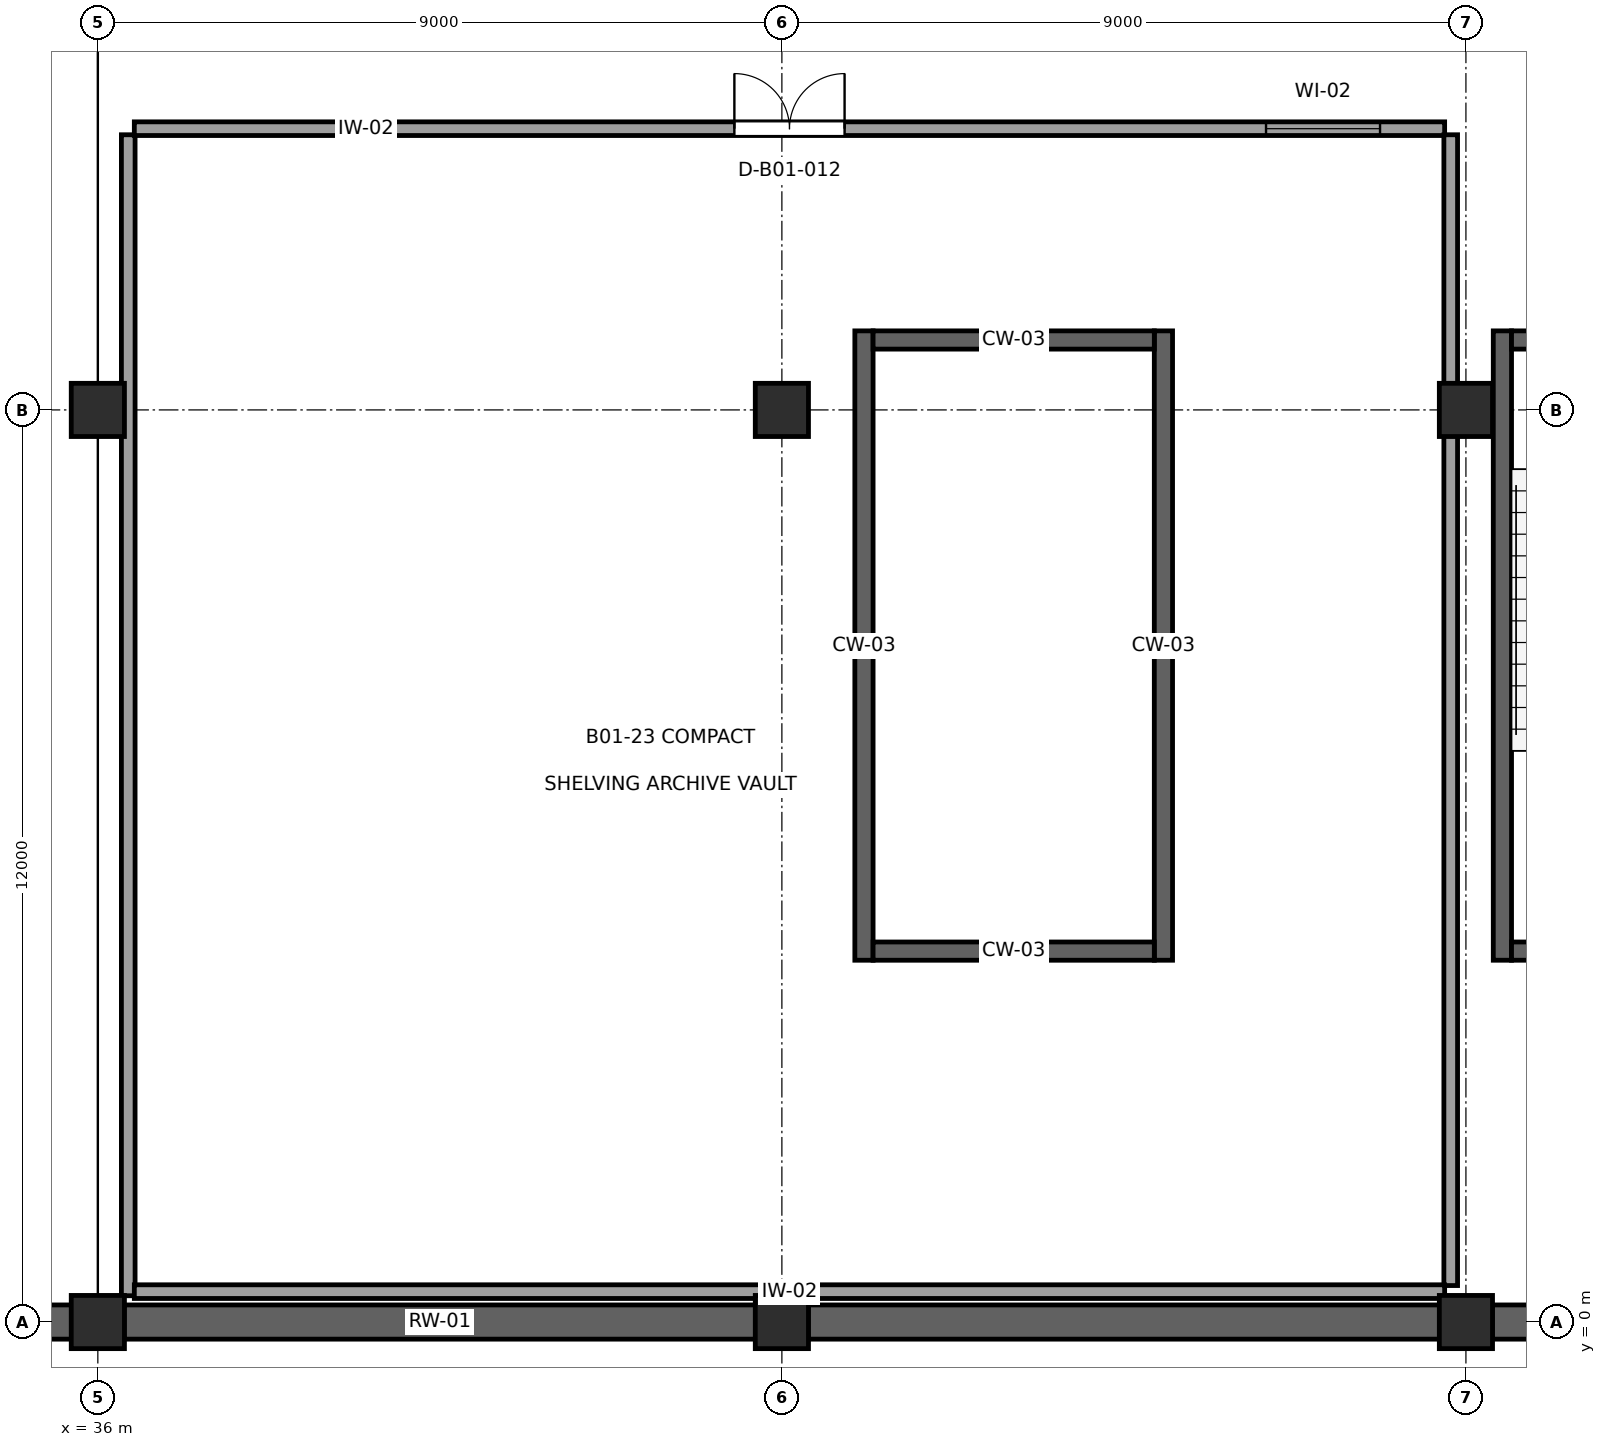
"""IFC4 building model, lengths in metres.
Left out: names, types, materials, properties, quantities, classifications, styles, units other than length and angle.
Written with IfcOpenShell. Run it as: python <this file> out.ifc"""

import sys

from ifc_helpers import new_model, si_unit, direction, frame, frame_2d, origin, origin_2d, place, context, subcontext, project, spatial, rectangle, extrude, element, fill, save


model = new_model("IFC4")
c1 = context("Model", 3, precision=1e-05, world=origin(), true_north=direction((0.0, 1.0)))
c2 = subcontext(c1, "Body", "Model", "MODEL_VIEW")
j1 = project(units=[si_unit("LENGTHUNIT", "METRE"), si_unit("PLANEANGLEUNIT", "RADIAN")], contexts=[c1])
p1 = place(None, origin())
s1 = spatial("IfcSite", under=j1, at=p1, CompositionType="ELEMENT")
p2 = place(p1, origin())
s2 = spatial("IfcBuilding", under=s1, at=p2, CompositionType="ELEMENT")
p3 = place(p2, frame((0.0, 0.0, -4.5)))
s3 = spatial("IfcBuildingStorey", under=s2, at=p3, CompositionType="ELEMENT", Elevation=-4.5)
for number, where, z_axis, x_axis in (
    (1, (36.0, 0.0, 0.0), (0.0, 0.0, 1.0), (1.0, 0.0, 0.0)),
    (2, (36.0, 12.0, 0.0), (0.0, 0.0, 1.0), (1.0, 0.0, 0.0)),
    (3, (45.0, 0.0, 0.0), (0.0, 0.0, 1.0), (1.0, 0.0, 0.0)),
    (4, (45.0, 12.0, 0.0), (0.0, 0.0, 1.0), (1.0, 0.0, 0.0)),
    (5, (54.0, 0.0, 0.0), (0.0, 0.0, 1.0), (1.0, 0.0, 0.0)),
    (6, (54.0, 12.0, 0.0), (0.0, 0.0, 1.0), (1.0, 0.0, 0.0)),
):
    element("IfcColumn", number, at=place(p3, frame(where, z_axis=z_axis, x_axis=x_axis)), inside=s3, PredefinedType="COLUMN", context=c2, shape_type="SweptSolid", body=[
        extrude(rectangle(XDim=0.7, YDim=0.7, at=origin_2d()), origin(), (0.0, 0.0, 1.0), 4.5),
    ])
for number, where, z_axis, x_axis in (
    (7, (27.346, 0.0, 0.0), (0.0, 0.0, 1.0), (1.0, 0.0, 0.0)),
    (8, (36.346, 0.0, 0.0), (0.0, 0.0, 1.0), (1.0, 0.0, 0.0)),
    (9, (45.346, 0.0, 0.0), (0.0, 0.0, 1.0), (1.0, 0.0, 0.0)),
    (10, (54.346, 0.0, 0.0), (0.0, 0.0, 1.0), (1.0, 0.0, 0.0)),
):
    element("IfcWall", number, at=place(p3, frame(where, z_axis=z_axis, x_axis=x_axis)), inside=s3, PredefinedType="USERDEFINED", context=c2, shape_type="SweptSolid", body=[
        extrude(rectangle(XDim=8.308, YDim=0.45, at=frame_2d((4.154, 0.0))), origin(), (0.0, 0.0, 1.0), 4.32),
    ])
p4 = place(p3, frame((54.48, 4.76, 0.0), z_axis=(0.0, 0.0, 1.0), x_axis=(0.0, 1.0, 0.0)))
e11 = element("IfcWall", 11, at=p4, inside=s3, PredefinedType="SHEAR", context=c2, shape_type="SweptSolid", body=[
    extrude(rectangle(XDim=8.28, YDim=0.24, at=frame_2d((4.14, 0.0))), origin(), (0.0, 0.0, 1.0), 4.31),
])
for number, where, z_axis, x_axis in (
    (12, (54.6, 4.88, 0.0), (0.0, 0.0, 1.0), (1.0, 0.0, 0.0)),
    (13, (54.6, 12.92, 0.0), (0.0, 0.0, 1.0), (1.0, 0.0, 0.0)),
):
    element("IfcWall", number, at=place(p3, frame(where, z_axis=z_axis, x_axis=x_axis)), inside=s3, PredefinedType="SHEAR", context=c2, shape_type="SweptSolid", body=[
        extrude(rectangle(XDim=3.7, YDim=0.24, at=frame_2d((1.85, 0.0))), origin(), (0.0, 0.0, 1.0), 4.31),
    ])
for number, where, z_axis, x_axis in (
    (14, (46.08, 4.76, 0.0), (0.0, 0.0, 1.0), (0.0, 1.0, 0.0)),
    (15, (50.02, 4.76, 0.0), (0.0, 0.0, 1.0), (0.0, 1.0, 0.0)),
):
    element("IfcWall", number, at=place(p3, frame(where, z_axis=z_axis, x_axis=x_axis)), inside=s3, PredefinedType="SHEAR", context=c2, shape_type="SweptSolid", body=[
        extrude(rectangle(XDim=8.28, YDim=0.24, at=frame_2d((4.14, 0.0))), origin(), (0.0, 0.0, 1.0), 4.31),
    ])
for number, where, z_axis, x_axis in (
    (16, (46.2, 4.88, 0.0), (0.0, 0.0, 1.0), (1.0, 0.0, 0.0)),
    (17, (46.2, 12.92, 0.0), (0.0, 0.0, 1.0), (1.0, 0.0, 0.0)),
):
    element("IfcWall", number, at=place(p3, frame(where, z_axis=z_axis, x_axis=x_axis)), inside=s3, PredefinedType="SHEAR", context=c2, shape_type="SweptSolid", body=[
        extrude(rectangle(XDim=3.7, YDim=0.24, at=frame_2d((1.85, 0.0))), origin(), (0.0, 0.0, 1.0), 4.31),
    ])
p5 = place(p3, frame((36.4, 0.346, 0.0), z_axis=(0.0, 0.0, 1.0), x_axis=(0.0, 1.0, 0.0)))
e18 = element("IfcWall", 18, at=p5, inside=s3, PredefinedType="PARTITIONING", context=c2, shape_type="SweptSolid", body=[
    extrude(rectangle(XDim=15.274, YDim=0.18, at=frame_2d((7.637, 0.0))), origin(), (0.0, 0.0, 1.0), 4.14),
])
p6 = place(p3, frame((36.48, 15.7, 0.0), z_axis=(0.0, 0.0, 1.0), x_axis=(1.0, 0.0, 0.0)))
e19 = element("IfcWall", 19, at=p6, inside=s3, PredefinedType="PARTITIONING", context=c2, shape_type="SweptSolid", body=[
    extrude(rectangle(XDim=17.24, YDim=0.18, at=frame_2d((8.62, 0.0))), origin(), (0.0, 0.0, 1.0), 4.14),
])
p7 = place(p6, frame((7.895, 0.0, 0.0)))
e20 = element("IfcOpeningElement", 20, at=p7, cuts=e19, PredefinedType="OPENING", context=c2, shape_type="SweptSolid", body=[
    extrude(rectangle(XDim=1.45, YDim=2.3, at=frame_2d((0.725, 1.15))), frame((0.0, 0.105, 0.0), z_axis=(0.0, -1.0, 0.0), x_axis=(1.0, 0.0, 0.0)), (0.0, 0.0, 1.0), 0.21),
])
p8 = place(p6, frame((14.89, 0.0, 1.05)))
e21 = element("IfcOpeningElement", 21, at=p8, cuts=e19, PredefinedType="OPENING", context=c2, shape_type="SweptSolid", body=[
    extrude(rectangle(XDim=1.5, YDim=1.1, at=frame_2d((0.75, 0.55))), frame((0.0, 0.105, 0.0), z_axis=(0.0, -1.0, 0.0), x_axis=(1.0, 0.0, 0.0)), (0.0, 0.0, 1.0), 0.21),
])
p9 = place(p3, frame((53.8, 15.62, 0.0), z_axis=(0.0, 0.0, 1.0), x_axis=(0.0, -1.0, 0.0)))
e22 = element("IfcWall", 22, at=p9, inside=s3, PredefinedType="PARTITIONING", context=c2, shape_type="SweptSolid", body=[
    extrude(rectangle(XDim=15.14, YDim=0.18, at=frame_2d((7.57, 0.0))), origin(), (0.0, 0.0, 1.0), 3.825),
])
p10 = place(p3, frame((53.72, 0.4, 0.0), z_axis=(0.0, 0.0, 1.0), x_axis=(-1.0, 0.0, 0.0)))
e23 = element("IfcWall", 23, at=p10, inside=s3, PredefinedType="PARTITIONING", context=c2, shape_type="SweptSolid", body=[
    extrude(rectangle(XDim=17.24, YDim=0.18, at=frame_2d((8.62, 0.0))), origin(), (0.0, 0.0, 1.0), 4.14),
])
p11 = place(p7, origin())
e24 = element("IfcDoor", 24, at=p11, inside=s3, OperationType="DOUBLE_DOOR_SINGLE_SWING", PredefinedType="DOOR", context=c2, shape_type="SweptSolid", body=[
    extrude(rectangle(XDim=1.45, YDim=2.3, at=frame_2d((0.725, 1.15))), frame((0.0, 0.025, 0.0), z_axis=(0.0, -1.0, 0.0), x_axis=(1.0, 0.0, 0.0)), (0.0, 0.0, 1.0), 0.05),
])
fill(e20, e24)
p12 = place(p8, origin())
e25 = element("IfcWindow", 25, at=p12, inside=s3, PartitioningType="SINGLE_PANEL", PredefinedType="WINDOW", context=c2, shape_type="SweptSolid", body=[
    extrude(rectangle(XDim=1.5, YDim=1.1, at=frame_2d((0.75, 0.55))), frame((0.0, 0.03, 0.0), z_axis=(0.0, -1.0, 0.0), x_axis=(1.0, 0.0, 0.0)), (0.0, 0.0, 1.0), 0.06),
])
fill(e21, e25)
save(model, sys.argv[1])
